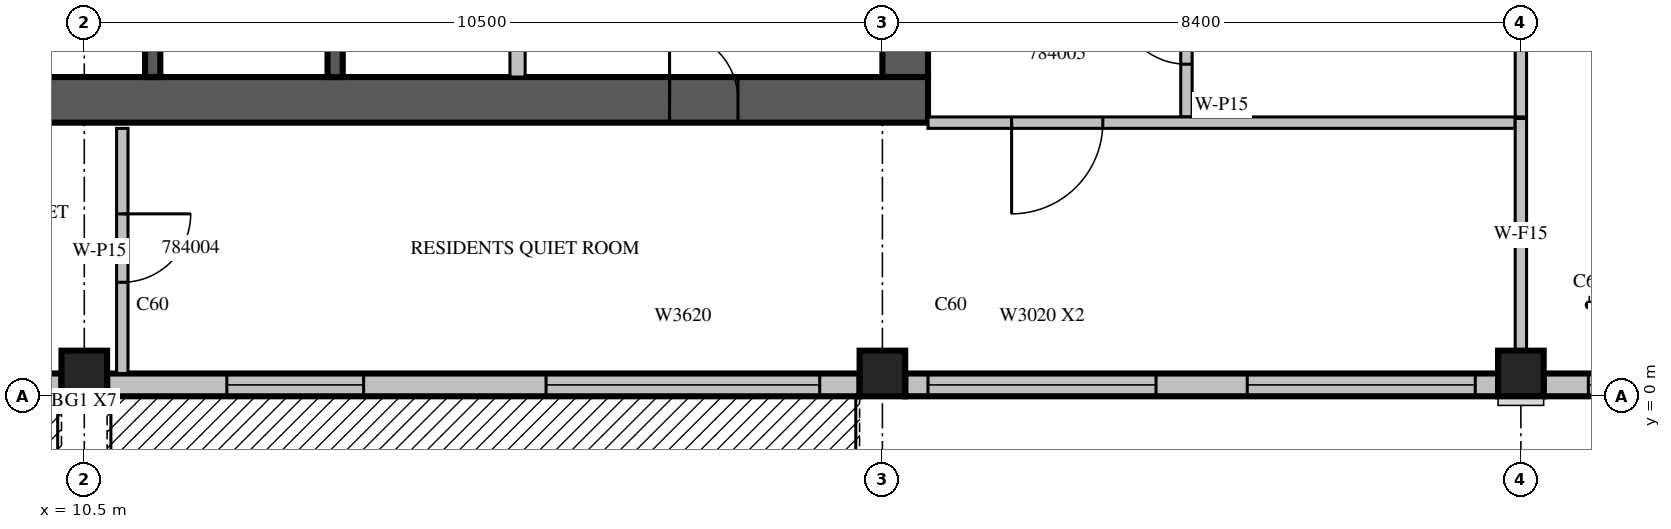
"""IFC4 building model, lengths in metres.
Left out: names, types, materials, properties, quantities, classifications, styles, units other than length and angle.
Written with IfcOpenShell. Run it as: python <this file> out.ifc"""

import sys

from ifc_helpers import new_model, si_unit, direction, frame, frame_2d, origin, origin_2d, place, context, subcontext, project, spatial, rectangle, extrude, source, transform, mapped, element, fill, save


model = new_model("IFC4")
c1 = context("Model", 3, precision=1e-05, world=origin(), true_north=direction((0.0, 1.0)))
c2 = subcontext(c1, "Body", "Model", "MODEL_VIEW")
j1 = project(units=[si_unit("LENGTHUNIT", "METRE"), si_unit("PLANEANGLEUNIT", "RADIAN")], contexts=[c1])
p1 = place(None, origin())
s1 = spatial("IfcSite", under=j1, at=p1, CompositionType="ELEMENT")
p2 = place(p1, origin())
s2 = spatial("IfcBuilding", under=s1, at=p2, CompositionType="ELEMENT")
p3 = place(p2, frame((0.0, 0.0, 354.5)))
s3 = spatial("IfcBuildingStorey", under=s2, at=p3, CompositionType="ELEMENT", Elevation=354.5)
m1 = source(origin(), c2, "Body", "SweptSolid", [
    extrude(rectangle(XDim=0.6, YDim=0.6, at=origin_2d()), origin(), (0.0, 0.0, 1.0), 3.5),
])
for number, where, z_axis, x_axis in (
    (1, (10.5, 0.3, 0.0), (0.0, 0.0, 1.0), (1.0, 0.0, 0.0)),
    (2, (21.0, 0.3, 0.0), (0.0, 0.0, 1.0), (1.0, 0.0, 0.0)),
    (3, (29.4, 0.3, 0.0), (0.0, 0.0, 1.0), (1.0, 0.0, 0.0)),
):
    element("IfcColumn", number, at=place(p3, frame(where, z_axis=z_axis, x_axis=x_axis)), inside=s3, PredefinedType="COLUMN", context=c2, shape_type="MappedRepresentation", body=[
        mapped(m1, transform((0.0, 0.0, 0.0), scale=1.0)),
    ])
m2 = source(origin(), c2, "Body", "SweptSolid", [
    extrude(rectangle(XDim=6.3, YDim=0.6, at=frame_2d((3.15, 0.0))), origin(), (0.0, 0.0, 1.0), 3.5),
])
p4 = place(p3, frame((21.3, 4.2, 0.0), z_axis=(0.0, 0.0, 1.0), x_axis=(0.0, 1.0, 0.0)))
e4 = element("IfcWall", 4, at=p4, inside=s3, PredefinedType="SHEAR", context=c2, shape_type="MappedRepresentation", body=[
    mapped(m2, transform((0.0, 0.0, 0.0), scale=1.0)),
])
m3 = source(origin(), c2, "Body", "SweptSolid", [
    extrude(rectangle(XDim=2.2, YDim=2.1, at=frame_2d((1.1, 1.05))), frame((0.0, 0.31, 0.0), z_axis=(0.0, -1.0, 0.0), x_axis=(1.0, 0.0, 0.0)), (0.0, 0.0, 1.0), 0.62),
])
p5 = place(p4, frame((4.0, 0.0, 0.0)))
e5 = element("IfcOpeningElement", 5, at=p5, cuts=e4, PredefinedType="OPENING", context=c2, shape_type="MappedRepresentation", body=[
    mapped(m3, transform((0.0, 0.0, 0.0), scale=1.0)),
])
m4 = source(origin(), c2, "Body", "SweptSolid", [
    extrude(rectangle(XDim=17.4, YDim=0.6, at=frame_2d((8.7, 0.0))), origin(), (0.0, 0.0, 1.0), 3.5),
])
p6 = place(p3, frame((4.2, 3.9, 0.0), z_axis=(0.0, 0.0, 1.0), x_axis=(1.0, 0.0, 0.0)))
e6 = element("IfcWall", 6, at=p6, inside=s3, PredefinedType="SHEAR", context=c2, shape_type="MappedRepresentation", body=[
    mapped(m4, transform((0.0, 0.0, 0.0), scale=1.0)),
])
m5 = source(origin(), c2, "Body", "SweptSolid", [
    extrude(rectangle(XDim=0.9, YDim=2.1, at=frame_2d((0.45, 1.05))), frame((0.0, 0.31, 0.0), z_axis=(0.0, -1.0, 0.0), x_axis=(1.0, 0.0, 0.0)), (0.0, 0.0, 1.0), 0.62),
])
p7 = place(p6, frame((14.0, 0.0, 0.0)))
e7 = element("IfcOpeningElement", 7, at=p7, cuts=e6, PredefinedType="OPENING", context=c2, shape_type="MappedRepresentation", body=[
    mapped(m5, transform((0.0, 0.0, 0.0), scale=1.0)),
])
m6 = source(origin(), c2, "Body", "SweptSolid", [
    extrude(rectangle(XDim=6.0, YDim=0.3, at=frame_2d((3.0, 0.0))), origin(), (0.0, 0.0, 1.0), 3.1),
])
p8 = place(p3, frame((4.2, 0.15, 0.0), z_axis=(0.0, 0.0, 1.0), x_axis=(1.0, 0.0, 0.0)))
e8 = element("IfcWall", 8, at=p8, inside=s3, PredefinedType="STANDARD", context=c2, shape_type="MappedRepresentation", body=[
    mapped(m6, transform((0.0, 0.0, 0.0), scale=1.0)),
])
m7 = source(origin(), c2, "Body", "SweptSolid", [
    extrude(rectangle(XDim=1.8, YDim=2.4, at=frame_2d((0.9, 1.2))), frame((0.0, 0.16, 0.0), z_axis=(0.0, -1.0, 0.0), x_axis=(1.0, 0.0, 0.0)), (0.0, 0.0, 1.0), 0.32),
])
p9 = place(p8, frame((0.675, 0.0, 0.0)))
e9 = element("IfcOpeningElement", 9, at=p9, cuts=e8, PredefinedType="OPENING", context=c2, shape_type="MappedRepresentation", body=[
    mapped(m7, transform((0.0, 0.0, 0.0), scale=1.0)),
])
m8 = source(origin(), c2, "Body", "SweptSolid", [
    extrude(rectangle(XDim=1.8, YDim=2.0, at=frame_2d((0.9, 1.0))), frame((0.0, 0.16, 0.0), z_axis=(0.0, -1.0, 0.0), x_axis=(1.0, 0.0, 0.0)), (0.0, 0.0, 1.0), 0.32),
])
p10 = place(p8, frame((3.825, 0.0, 0.6)))
e10 = element("IfcOpeningElement", 10, at=p10, cuts=e8, PredefinedType="OPENING", context=c2, shape_type="MappedRepresentation", body=[
    mapped(m8, transform((0.0, 0.0, 0.0), scale=1.0)),
])
m9 = source(origin(), c2, "Body", "SweptSolid", [
    extrude(rectangle(XDim=9.9, YDim=0.3, at=frame_2d((4.95, 0.0))), origin(), (0.0, 0.0, 1.0), 3.1),
])
p11 = place(p3, frame((10.8, 0.15, 0.0), z_axis=(0.0, 0.0, 1.0), x_axis=(1.0, 0.0, 0.0)))
e11 = element("IfcWall", 11, at=p11, inside=s3, PredefinedType="STANDARD", context=c2, shape_type="MappedRepresentation", body=[
    mapped(m9, transform((0.0, 0.0, 0.0), scale=1.0)),
])
p12 = place(p11, frame((1.575, 0.0, 0.0)))
e12 = element("IfcOpeningElement", 12, at=p12, cuts=e11, PredefinedType="OPENING", context=c2, shape_type="MappedRepresentation", body=[
    mapped(m7, transform((0.0, 0.0, 0.0), scale=1.0)),
])
m10 = source(origin(), c2, "Body", "SweptSolid", [
    extrude(rectangle(XDim=3.6, YDim=2.0, at=frame_2d((1.8, 1.0))), frame((0.0, 0.16, 0.0), z_axis=(0.0, -1.0, 0.0), x_axis=(1.0, 0.0, 0.0)), (0.0, 0.0, 1.0), 0.32),
])
p13 = place(p11, frame((5.775, 0.0, 0.6)))
e13 = element("IfcOpeningElement", 13, at=p13, cuts=e11, PredefinedType="OPENING", context=c2, shape_type="MappedRepresentation", body=[
    mapped(m10, transform((0.0, 0.0, 0.0), scale=1.0)),
])
m11 = source(origin(), c2, "Body", "SweptSolid", [
    extrude(rectangle(XDim=7.8, YDim=0.3, at=frame_2d((3.9, 0.0))), origin(), (0.0, 0.0, 1.0), 3.1),
])
p14 = place(p3, frame((21.3, 0.15, 0.0), z_axis=(0.0, 0.0, 1.0), x_axis=(1.0, 0.0, 0.0)))
e14 = element("IfcWall", 14, at=p14, inside=s3, PredefinedType="STANDARD", context=c2, shape_type="MappedRepresentation", body=[
    mapped(m11, transform((0.0, 0.0, 0.0), scale=1.0)),
])
m12 = source(origin(), c2, "Body", "SweptSolid", [
    extrude(rectangle(XDim=3.0, YDim=2.0, at=frame_2d((1.5, 1.0))), frame((0.0, 0.16, 0.0), z_axis=(0.0, -1.0, 0.0), x_axis=(1.0, 0.0, 0.0)), (0.0, 0.0, 1.0), 0.32),
])
p15 = place(p14, frame((0.3, 0.0, 0.6)))
e15 = element("IfcOpeningElement", 15, at=p15, cuts=e14, PredefinedType="OPENING", context=c2, shape_type="MappedRepresentation", body=[
    mapped(m12, transform((0.0, 0.0, 0.0), scale=1.0)),
])
p16 = place(p14, frame((4.5, 0.0, 0.6)))
e16 = element("IfcOpeningElement", 16, at=p16, cuts=e14, PredefinedType="OPENING", context=c2, shape_type="MappedRepresentation", body=[
    mapped(m12, transform((0.0, 0.0, 0.0), scale=1.0)),
])
p17 = place(p3, frame((29.7, 0.15, 0.0), z_axis=(0.0, 0.0, 1.0), x_axis=(1.0, 0.0, 0.0)))
e17 = element("IfcWall", 17, at=p17, inside=s3, PredefinedType="STANDARD", context=c2, shape_type="MappedRepresentation", body=[
    mapped(m11, transform((0.0, 0.0, 0.0), scale=1.0)),
])
m13 = source(origin(), c2, "Body", "SweptSolid", [
    extrude(rectangle(XDim=1.2, YDim=2.0, at=frame_2d((0.6, 1.0))), frame((0.0, 0.16, 0.0), z_axis=(0.0, -1.0, 0.0), x_axis=(1.0, 0.0, 0.0)), (0.0, 0.0, 1.0), 0.32),
])
p18 = place(p17, frame((0.588, 0.0, 0.6)))
e18 = element("IfcOpeningElement", 18, at=p18, cuts=e17, PredefinedType="OPENING", context=c2, shape_type="MappedRepresentation", body=[
    mapped(m13, transform((0.0, 0.0, 0.0), scale=1.0)),
])
p19 = place(p17, frame((6.112, 0.0, 0.6)))
e19 = element("IfcOpeningElement", 19, at=p19, cuts=e17, PredefinedType="OPENING", context=c2, shape_type="MappedRepresentation", body=[
    mapped(m13, transform((0.0, 0.0, 0.0), scale=1.0)),
])
m14 = source(origin(), c2, "Body", "SweptSolid", [
    extrude(rectangle(XDim=2.4, YDim=2.0, at=frame_2d((1.2, 1.0))), frame((0.0, 0.16, 0.0), z_axis=(0.0, -1.0, 0.0), x_axis=(1.0, 0.0, 0.0)), (0.0, 0.0, 1.0), 0.32),
])
p20 = place(p17, frame((2.75, 0.0, 0.6)))
e20 = element("IfcOpeningElement", 20, at=p20, cuts=e17, PredefinedType="OPENING", context=c2, shape_type="MappedRepresentation", body=[
    mapped(m14, transform((0.0, 0.0, 0.0), scale=1.0)),
])
m15 = source(origin(), c2, "Body", "SweptSolid", [
    extrude(rectangle(XDim=3.1, YDim=0.2, at=frame_2d((1.55, 0.0))), origin(), (0.0, 0.0, 1.0), 3.5),
])
p21 = place(p3, frame((11.4, 4.2, 0.0), z_axis=(0.0, 0.0, 1.0), x_axis=(0.0, 1.0, 0.0)))
e21 = element("IfcWall", 21, at=p21, inside=s3, PredefinedType="SOLIDWALL", context=c2, shape_type="MappedRepresentation", body=[
    mapped(m15, transform((0.0, 0.0, 0.0), scale=1.0)),
])
m16 = source(origin(), c2, "Body", "SweptSolid", [
    extrude(rectangle(XDim=3.1, YDim=0.2, at=frame_2d((1.55, 0.0))), origin(), (0.0, 0.0, 1.0), 3.1),
])
p22 = place(p3, frame((13.8, 4.2, 0.0), z_axis=(0.0, 0.0, 1.0), x_axis=(0.0, 1.0, 0.0)))
e22 = element("IfcWall", 22, at=p22, inside=s3, PredefinedType="SOLIDWALL", context=c2, shape_type="MappedRepresentation", body=[
    mapped(m16, transform((0.0, 0.0, 0.0), scale=1.0)),
])
m17 = source(origin(), c2, "Body", "SweptSolid", [
    extrude(rectangle(XDim=3.1, YDim=0.2, at=frame_2d((1.55, 0.0))), origin(), (0.0, 0.0, 1.0), 3.1),
])
p23 = place(p3, frame((16.2, 4.2, 0.0), z_axis=(0.0, 0.0, 1.0), x_axis=(0.0, 1.0, 0.0)))
e23 = element("IfcWall", 23, at=p23, inside=s3, PredefinedType="PARTITIONING", context=c2, shape_type="MappedRepresentation", body=[
    mapped(m17, transform((0.0, 0.0, 0.0), scale=1.0)),
])
m18 = source(origin(), c2, "Body", "SweptSolid", [
    extrude(rectangle(XDim=4.575, YDim=0.15, at=frame_2d((2.288, 0.0))), origin(), (0.0, 0.0, 1.0), 3.1),
])
p24 = place(p3, frame((25.0, 8.25, 0.0), z_axis=(0.0, 0.0, 1.0), x_axis=(0.0, -1.0, 0.0)))
e24 = element("IfcWall", 24, at=p24, inside=s3, PredefinedType="PARTITIONING", context=c2, shape_type="MappedRepresentation", body=[
    mapped(m18, transform((0.0, 0.0, 0.0), scale=1.0)),
])
m19 = source(origin(), c2, "Body", "SweptSolid", [
    extrude(rectangle(XDim=0.9, YDim=2.1, at=frame_2d((0.45, 1.05))), frame((0.0, 0.085, 0.0), z_axis=(0.0, -1.0, 0.0), x_axis=(1.0, 0.0, 0.0)), (0.0, 0.0, 1.0), 0.17),
])
p25 = place(p24, frame((2.981, 0.0, 0.0)))
e25 = element("IfcOpeningElement", 25, at=p25, cuts=e24, PredefinedType="OPENING", context=c2, shape_type="MappedRepresentation", body=[
    mapped(m19, transform((0.0, 0.0, 0.0), scale=1.0)),
])
p26 = place(p3, frame((29.4, 3.675, 0.0), z_axis=(0.0, 0.0, 1.0), x_axis=(0.0, 1.0, 0.0)))
e26 = element("IfcWall", 26, at=p26, inside=s3, PredefinedType="PARTITIONING", context=c2, shape_type="MappedRepresentation", body=[
    mapped(m18, transform((0.0, 0.0, 0.0), scale=1.0)),
])
m20 = source(origin(), c2, "Body", "SweptSolid", [
    extrude(rectangle(XDim=3.225, YDim=0.15, at=frame_2d((1.613, 0.0))), origin(), (0.0, 0.0, 1.0), 3.1),
])
p27 = place(p3, frame((11.0, 3.525, 0.0), z_axis=(0.0, 0.0, 1.0), x_axis=(0.0, -1.0, 0.0)))
e27 = element("IfcWall", 27, at=p27, inside=s3, PredefinedType="PARTITIONING", context=c2, shape_type="MappedRepresentation", body=[
    mapped(m20, transform((0.0, 0.0, 0.0), scale=1.0)),
])
p28 = place(p27, frame((1.125, 0.0, 0.0)))
e28 = element("IfcOpeningElement", 28, at=p28, cuts=e27, PredefinedType="OPENING", context=c2, shape_type="MappedRepresentation", body=[
    mapped(m19, transform((0.0, 0.0, 0.0), scale=1.0)),
])
m21 = source(origin(), c2, "Body", "SweptSolid", [
    extrude(rectangle(XDim=7.725, YDim=0.15, at=frame_2d((3.862, 0.0))), origin(), (0.0, 0.0, 1.0), 3.1),
])
p29 = place(p3, frame((21.6, 3.6, 0.0), z_axis=(0.0, 0.0, 1.0), x_axis=(1.0, 0.0, 0.0)))
e29 = element("IfcWall", 29, at=p29, inside=s3, PredefinedType="PARTITIONING", context=c2, shape_type="MappedRepresentation", body=[
    mapped(m21, transform((0.0, 0.0, 0.0), scale=1.0)),
])
m22 = source(origin(), c2, "Body", "SweptSolid", [
    extrude(rectangle(XDim=1.2, YDim=2.1, at=frame_2d((0.6, 1.05))), frame((0.0, 0.085, 0.0), z_axis=(0.0, -1.0, 0.0), x_axis=(1.0, 0.0, 0.0)), (0.0, 0.0, 1.0), 0.17),
])
p30 = place(p29, frame((1.1, 0.0, 0.0)))
e30 = element("IfcOpeningElement", 30, at=p30, cuts=e29, PredefinedType="OPENING", context=c2, shape_type="MappedRepresentation", body=[
    mapped(m22, transform((0.0, 0.0, 0.0), scale=1.0)),
])
m23 = source(origin(), c2, "Body", "SweptSolid", [
    extrude(rectangle(XDim=3.056, YDim=0.15, at=frame_2d((1.528, 0.0))), origin(), (0.0, 0.0, 1.0), 3.1),
])
p31 = place(p3, frame((29.4, 0.599, 0.0), z_axis=(0.0, 0.0, 1.0), x_axis=(0.0, 1.0, 0.0)))
e31 = element("IfcWall", 31, at=p31, inside=s3, PredefinedType="PARTITIONING", context=c2, shape_type="MappedRepresentation", body=[
    mapped(m23, transform((0.0, 0.0, 0.0), scale=1.0)),
])
m24 = source(origin(), c2, "Body", "SweptSolid", [
    extrude(rectangle(XDim=1.8, YDim=2.4, at=frame_2d((0.9, 1.2))), frame((0.0, 0.025, 0.0), z_axis=(0.0, -1.0, 0.0), x_axis=(1.0, 0.0, 0.0)), (0.0, 0.0, 1.0), 0.05),
])
p32 = place(p12, origin())
e32 = element("IfcDoor", 32, at=p32, inside=s3, OperationType="SLIDING_TO_LEFT", PredefinedType="DOOR", context=c2, shape_type="MappedRepresentation", body=[
    mapped(m24, transform((0.0, 0.0, 0.0), scale=1.0)),
])
fill(e12, e32)
m25 = source(origin(), c2, "Body", "SweptSolid", [
    extrude(rectangle(XDim=3.6, YDim=2.0, at=frame_2d((1.8, 1.0))), frame((0.0, 0.03, 0.0), z_axis=(0.0, -1.0, 0.0), x_axis=(1.0, 0.0, 0.0)), (0.0, 0.0, 1.0), 0.06),
])
p33 = place(p13, origin())
e33 = element("IfcWindow", 33, at=p33, inside=s3, PartitioningType="SINGLE_PANEL", PredefinedType="WINDOW", context=c2, shape_type="MappedRepresentation", body=[
    mapped(m25, transform((0.0, 0.0, 0.0), scale=1.0)),
])
fill(e13, e33)
m26 = source(origin(), c2, "Body", "SweptSolid", [
    extrude(rectangle(XDim=3.0, YDim=2.0, at=frame_2d((1.5, 1.0))), frame((0.0, 0.03, 0.0), z_axis=(0.0, -1.0, 0.0), x_axis=(1.0, 0.0, 0.0)), (0.0, 0.0, 1.0), 0.06),
])
p34 = place(p15, origin())
e34 = element("IfcWindow", 34, at=p34, inside=s3, PartitioningType="SINGLE_PANEL", PredefinedType="WINDOW", context=c2, shape_type="MappedRepresentation", body=[
    mapped(m26, transform((0.0, 0.0, 0.0), scale=1.0)),
])
fill(e15, e34)
p35 = place(p16, origin())
e35 = element("IfcWindow", 35, at=p35, inside=s3, PartitioningType="SINGLE_PANEL", PredefinedType="WINDOW", context=c2, shape_type="MappedRepresentation", body=[
    mapped(m26, transform((0.0, 0.0, 0.0), scale=1.0)),
])
fill(e16, e35)
m27 = source(origin(), c2, "Body", "SweptSolid", [
    extrude(rectangle(XDim=1.2, YDim=2.0, at=frame_2d((0.6, 1.0))), frame((0.0, 0.03, 0.0), z_axis=(0.0, -1.0, 0.0), x_axis=(1.0, 0.0, 0.0)), (0.0, 0.0, 1.0), 0.06),
])
p36 = place(p18, origin())
e36 = element("IfcWindow", 36, at=p36, inside=s3, PartitioningType="SINGLE_PANEL", PredefinedType="WINDOW", context=c2, shape_type="MappedRepresentation", body=[
    mapped(m27, transform((0.0, 0.0, 0.0), scale=1.0)),
])
fill(e18, e36)
m28 = source(origin(), c2, "Body", "SweptSolid", [
    extrude(rectangle(XDim=0.9, YDim=2.1, at=frame_2d((0.45, 1.05))), frame((0.0, 0.025, 0.0), z_axis=(0.0, -1.0, 0.0), x_axis=(1.0, 0.0, 0.0)), (0.0, 0.0, 1.0), 0.05),
])
p37 = place(p7, origin())
e37 = element("IfcDoor", 37, at=p37, inside=s3, OperationType="SINGLE_SWING_LEFT", PredefinedType="DOOR", context=c2, shape_type="MappedRepresentation", body=[
    mapped(m28, transform((0.0, 0.0, 0.0), scale=1.0)),
])
fill(e7, e37)
p38 = place(p25, origin())
e38 = element("IfcDoor", 38, at=p38, inside=s3, OperationType="SINGLE_SWING_RIGHT", PredefinedType="DOOR", context=c2, shape_type="MappedRepresentation", body=[
    mapped(m28, transform((0.0, 0.0, 0.0), scale=1.0)),
])
fill(e25, e38)
p39 = place(p28, origin())
e39 = element("IfcDoor", 39, at=p39, inside=s3, OperationType="SINGLE_SWING_LEFT", PredefinedType="DOOR", context=c2, shape_type="MappedRepresentation", body=[
    mapped(m28, transform((0.0, 0.0, 0.0), scale=1.0)),
])
fill(e28, e39)
m29 = source(origin(), c2, "Body", "SweptSolid", [
    extrude(rectangle(XDim=1.2, YDim=2.1, at=frame_2d((0.6, 1.05))), frame((0.0, 0.025, 0.0), z_axis=(0.0, -1.0, 0.0), x_axis=(1.0, 0.0, 0.0)), (0.0, 0.0, 1.0), 0.05),
])
p40 = place(p30, origin())
e40 = element("IfcDoor", 40, at=p40, inside=s3, OperationType="SINGLE_SWING_RIGHT", PredefinedType="DOOR", context=c2, shape_type="MappedRepresentation", body=[
    mapped(m29, transform((0.0, 0.0, 0.0), scale=1.0)),
])
fill(e30, e40)
save(model, sys.argv[1])
